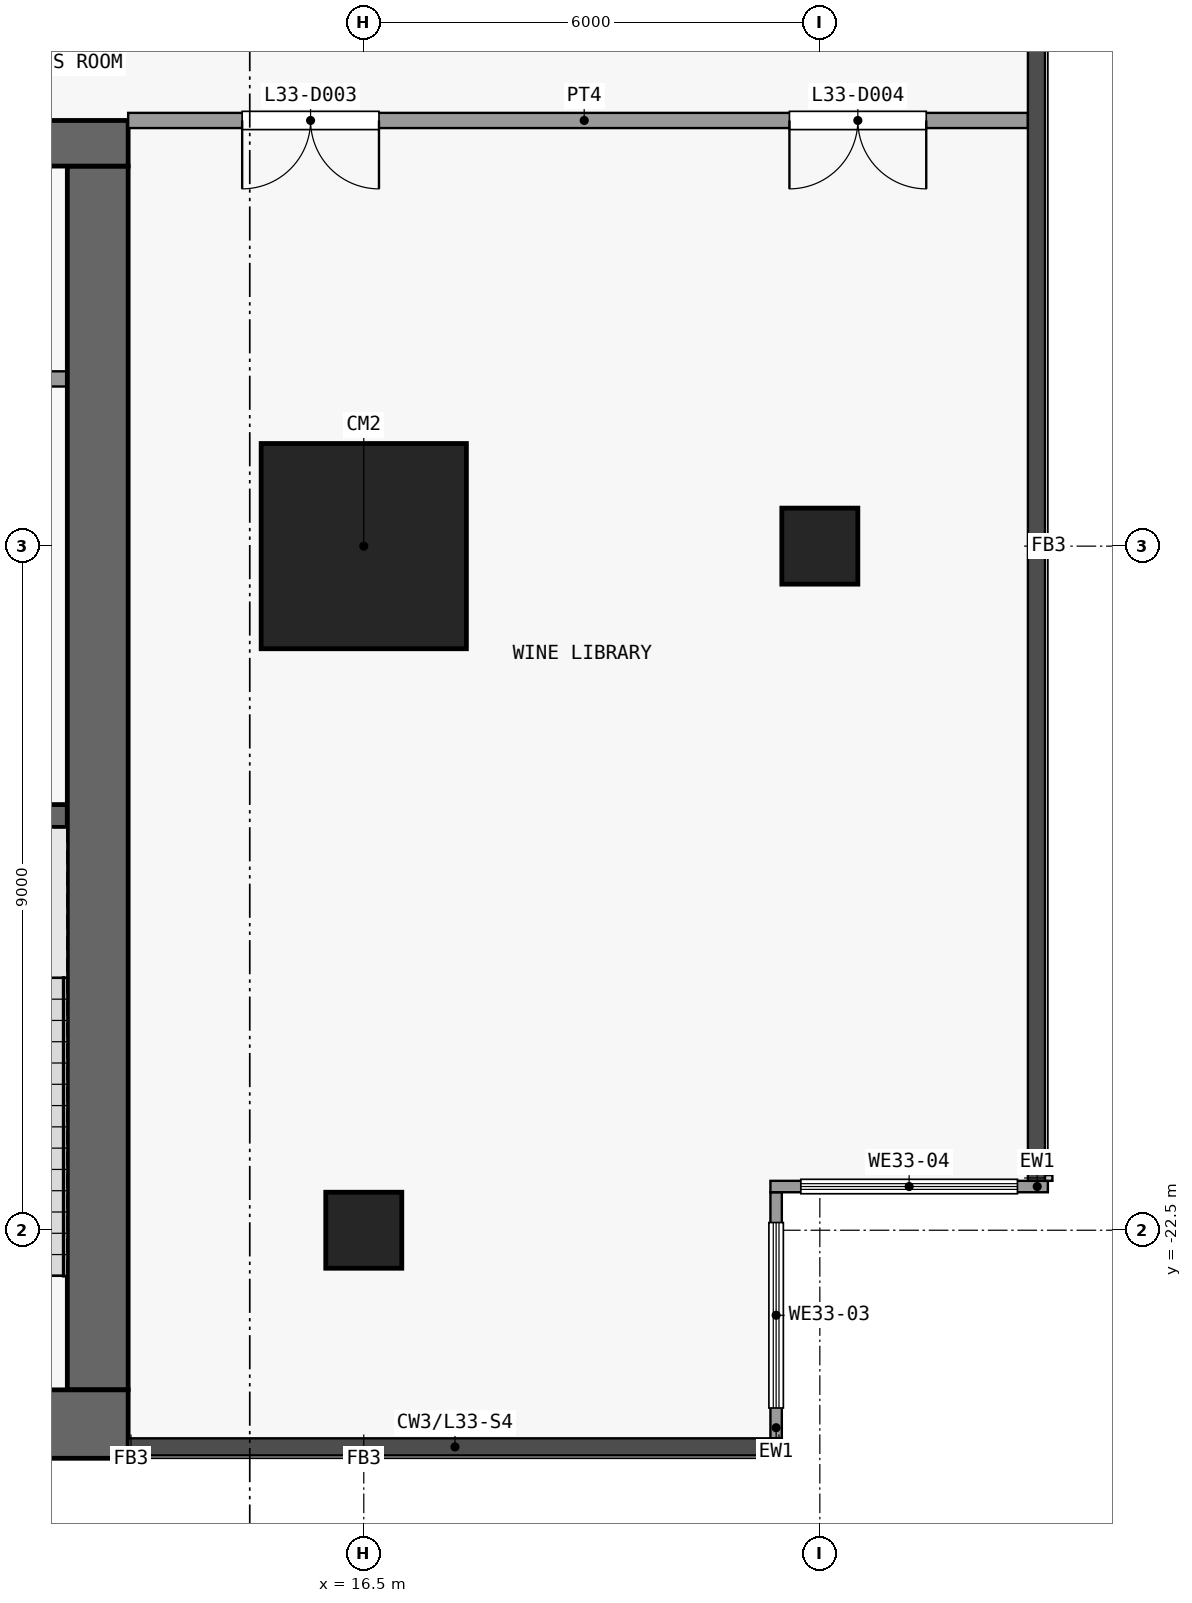
"""IFC4 building model, lengths in metres.
Left out: names, types, materials, properties, quantities, classifications, styles, units other than length and angle.
Written with IfcOpenShell. Run it as: python <this file> out.ifc"""

import sys

from ifc_helpers import new_model, si_unit, direction, frame, frame_2d, origin, origin_2d, place, context, subcontext, project, spatial, rectangle, extrude, element, fill, save


model = new_model("IFC4")
c1 = context("Model", 3, precision=1e-05, world=origin(), true_north=direction((0.0, 1.0)))
c2 = subcontext(c1, "Body", "Model", "MODEL_VIEW")
j1 = project(units=[si_unit("LENGTHUNIT", "METRE"), si_unit("PLANEANGLEUNIT", "RADIAN")], contexts=[c1])
p1 = place(None, origin())
s1 = spatial("IfcSite", under=j1, at=p1, CompositionType="ELEMENT")
p2 = place(p1, origin())
s2 = spatial("IfcBuilding", under=s1, at=p2, CompositionType="ELEMENT")
p3 = place(p2, frame((0.0, 0.0, 133.9)))
s3 = spatial("IfcBuildingStorey", under=s2, at=p3, CompositionType="ELEMENT", Elevation=133.9)
p4 = place(p3, frame((16.5, -22.5, 0.0), z_axis=(0.0, 0.0, 1.0), x_axis=(1.0, 0.0, 0.0)))
e1 = element("IfcColumn", 1, at=p4, inside=s3, PredefinedType="COLUMN", context=c2, shape_type="SweptSolid", body=[
    extrude(rectangle(XDim=1.0, YDim=1.0, at=origin_2d()), origin(), (0.0, 0.0, 1.0), 5.0),
])
p5 = place(p3, frame((16.5, -13.5, 0.0), z_axis=(0.0, 0.0, 1.0), x_axis=(1.0, 0.0, 0.0)))
e2 = element("IfcColumn", 2, at=p5, inside=s3, PredefinedType="COLUMN", context=c2, shape_type="SweptSolid", body=[
    extrude(rectangle(XDim=2.7, YDim=2.7, at=origin_2d()), origin(), (0.0, 0.0, 1.0), 5.0),
])
p6 = place(p3, frame((22.5, -13.5, 0.0), z_axis=(0.0, 0.0, 1.0), x_axis=(1.0, 0.0, 0.0)))
e3 = element("IfcColumn", 3, at=p6, inside=s3, PredefinedType="COLUMN", context=c2, shape_type="SweptSolid", body=[
    extrude(rectangle(XDim=1.0, YDim=1.0, at=origin_2d()), origin(), (0.0, 0.0, 1.0), 5.0),
])
p7 = place(p3, frame((-13.4, -25.05, 0.0), z_axis=(0.0, 0.0, 1.0), x_axis=(1.0, 0.0, 0.0)))
e4 = element("IfcWall", 4, at=p7, inside=s3, PredefinedType="SHEAR", context=c2, shape_type="SweptSolid", body=[
    extrude(rectangle(XDim=26.8, YDim=0.9, at=frame_2d((13.4, 0.0))), origin(), (0.0, 0.0, 1.0), 4.7),
])
p8 = place(p3, frame((-13.4, -8.2, 0.0), z_axis=(0.0, 0.0, 1.0), x_axis=(1.0, 0.0, 0.0)))
e5 = element("IfcWall", 5, at=p8, inside=s3, PredefinedType="SHEAR", context=c2, shape_type="SweptSolid", body=[
    extrude(rectangle(XDim=26.8, YDim=0.6, at=frame_2d((13.4, 0.0))), origin(), (0.0, 0.0, 1.0), 4.7),
])
p9 = place(p8, frame((7.7, 0.0, 0.0)))
e6 = element("IfcOpeningElement", 6, at=p9, cuts=e5, PredefinedType="OPENING", context=c2, shape_type="SweptSolid", body=[
    extrude(rectangle(XDim=1.8, YDim=2.1, at=frame_2d((0.9, 1.05))), frame((0.0, 0.31, 0.0), z_axis=(0.0, -1.0, 0.0), x_axis=(1.0, 0.0, 0.0)), (0.0, 0.0, 1.0), 0.62),
])
p10 = place(p8, frame((17.3, 0.0, 0.0)))
e7 = element("IfcOpeningElement", 7, at=p10, cuts=e5, PredefinedType="OPENING", context=c2, shape_type="SweptSolid", body=[
    extrude(rectangle(XDim=1.8, YDim=2.1, at=frame_2d((0.9, 1.05))), frame((0.0, 0.31, 0.0), z_axis=(0.0, -1.0, 0.0), x_axis=(1.0, 0.0, 0.0)), (0.0, 0.0, 1.0), 0.62),
])
p11 = place(p8, frame((2.625, 0.0, 0.0)))
e8 = element("IfcOpeningElement", 8, at=p11, cuts=e5, PredefinedType="OPENING", context=c2, shape_type="SweptSolid", body=[
    extrude(rectangle(XDim=0.9, YDim=2.1, at=frame_2d((0.45, 1.05))), frame((0.0, 0.31, 0.0), z_axis=(0.0, -1.0, 0.0), x_axis=(1.0, 0.0, 0.0)), (0.0, 0.0, 1.0), 0.62),
])
p12 = place(p8, frame((23.275, 0.0, 0.0)))
e9 = element("IfcOpeningElement", 9, at=p12, cuts=e5, PredefinedType="OPENING", context=c2, shape_type="SweptSolid", body=[
    extrude(rectangle(XDim=0.9, YDim=2.1, at=frame_2d((0.45, 1.05))), frame((0.0, 0.31, 0.0), z_axis=(0.0, -1.0, 0.0), x_axis=(1.0, 0.0, 0.0)), (0.0, 0.0, 1.0), 0.62),
])
p13 = place(p3, frame((13.0, -24.6, 0.0), z_axis=(0.0, 0.0, 1.0), x_axis=(0.0, 1.0, 0.0)))
e10 = element("IfcWall", 10, at=p13, inside=s3, PredefinedType="SHEAR", context=c2, shape_type="SweptSolid", body=[
    extrude(rectangle(XDim=16.1, YDim=0.8, at=frame_2d((8.05, 0.0))), origin(), (0.0, 0.0, 1.0), 4.7),
])
p14 = place(p3, frame((9.5, -17.05, 0.0), z_axis=(0.0, 0.0, 1.0), x_axis=(1.0, 0.0, 0.0)))
e11 = element("IfcWall", 11, at=p14, inside=s3, PredefinedType="SHEAR", context=c2, shape_type="SweptSolid", body=[
    extrude(rectangle(XDim=3.1, YDim=0.3, at=frame_2d((1.55, 0.0))), origin(), (0.0, 0.0, 1.0), 4.7),
])
p15 = place(p3, frame((11.15, -11.3, 0.0), z_axis=(0.0, 0.0, 1.0), x_axis=(1.0, 0.0, 0.0)))
e12 = element("IfcWall", 12, at=p15, inside=s3, PredefinedType="PARTITIONING", context=c2, shape_type="SweptSolid", body=[
    extrude(rectangle(XDim=1.45, YDim=0.2, at=frame_2d((0.725, 0.0))), origin(), (0.0, 0.0, 1.0), 4.7),
])
p16 = place(p3, frame((21.925, -22.0, 0.0), z_axis=(0.0, 0.0, 1.0), x_axis=(0.0, -1.0, 0.0)))
e13 = element("IfcWall", 13, at=p16, inside=s3, PredefinedType="SOLIDWALL", context=c2, shape_type="SweptSolid", body=[
    extrude(rectangle(XDim=3.238, YDim=0.15, at=frame_2d((1.619, 0.0))), origin(), (0.0, 0.0, 1.0), 4.7),
])
p17 = place(p16, frame((0.399, 0.0, 0.9)))
e14 = element("IfcOpeningElement", 14, at=p17, cuts=e13, PredefinedType="OPENING", context=c2, shape_type="SweptSolid", body=[
    extrude(rectangle(XDim=2.44, YDim=2.4, at=frame_2d((1.22, 1.2))), frame((0.0, 0.085, 0.0), z_axis=(0.0, -1.0, 0.0), x_axis=(1.0, 0.0, 0.0)), (0.0, 0.0, 1.0), 0.17),
])
p18 = place(p3, frame((25.5, -21.925, 0.0), z_axis=(0.0, 0.0, 1.0), x_axis=(-1.0, 0.0, 0.0)))
e15 = element("IfcWall", 15, at=p18, inside=s3, PredefinedType="SOLIDWALL", context=c2, shape_type="SweptSolid", body=[
    extrude(rectangle(XDim=3.65, YDim=0.15, at=frame_2d((1.825, 0.0))), origin(), (0.0, 0.0, 1.0), 4.7),
])
p19 = place(p18, frame((0.4, 0.0, 0.9)))
e16 = element("IfcOpeningElement", 16, at=p19, cuts=e15, PredefinedType="OPENING", context=c2, shape_type="SweptSolid", body=[
    extrude(rectangle(XDim=2.85, YDim=2.4, at=frame_2d((1.425, 1.2))), frame((0.0, 0.085, 0.0), z_axis=(0.0, -1.0, 0.0), x_axis=(1.0, 0.0, 0.0)), (0.0, 0.0, 1.0), 0.17),
])
p20 = place(p3, frame((13.4, -7.9, 0.0), z_axis=(0.0, 0.0, 1.0), x_axis=(1.0, 0.0, 0.0)))
e17 = element("IfcWall", 17, at=p20, inside=s3, PredefinedType="PARTITIONING", context=c2, shape_type="SweptSolid", body=[
    extrude(rectangle(XDim=11.838, YDim=0.2, at=frame_2d((5.919, 0.0))), origin(), (0.0, 0.0, 1.0), 4.7),
])
p21 = place(p20, frame((1.5, 0.0, 0.0)))
e18 = element("IfcOpeningElement", 18, at=p21, cuts=e17, PredefinedType="OPENING", context=c2, shape_type="SweptSolid", body=[
    extrude(rectangle(XDim=1.8, YDim=2.1, at=frame_2d((0.9, 1.05))), frame((0.0, 0.11, 0.0), z_axis=(0.0, -1.0, 0.0), x_axis=(1.0, 0.0, 0.0)), (0.0, 0.0, 1.0), 0.22),
])
p22 = place(p20, frame((8.7, 0.0, 0.0)))
e19 = element("IfcOpeningElement", 19, at=p22, cuts=e17, PredefinedType="OPENING", context=c2, shape_type="SweptSolid", body=[
    extrude(rectangle(XDim=1.8, YDim=2.1, at=frame_2d((0.9, 1.05))), frame((0.0, 0.11, 0.0), z_axis=(0.0, -1.0, 0.0), x_axis=(1.0, 0.0, 0.0)), (0.0, 0.0, 1.0), 0.22),
])
p23 = place(p17, origin())
e20 = element("IfcWindow", 20, at=p23, inside=s3, PartitioningType="SINGLE_PANEL", PredefinedType="WINDOW", context=c2, shape_type="SweptSolid", body=[
    extrude(rectangle(XDim=2.44, YDim=2.4, at=frame_2d((1.22, 1.2))), frame((0.0, 0.03, 0.0), z_axis=(0.0, -1.0, 0.0), x_axis=(1.0, 0.0, 0.0)), (0.0, 0.0, 1.0), 0.06),
])
fill(e14, e20)
p24 = place(p19, origin())
e21 = element("IfcWindow", 21, at=p24, inside=s3, PartitioningType="SINGLE_PANEL", PredefinedType="WINDOW", context=c2, shape_type="SweptSolid", body=[
    extrude(rectangle(XDim=2.85, YDim=2.4, at=frame_2d((1.425, 1.2))), frame((0.0, 0.03, 0.0), z_axis=(0.0, -1.0, 0.0), x_axis=(1.0, 0.0, 0.0)), (0.0, 0.0, 1.0), 0.06),
])
fill(e16, e21)
p25 = place(p21, origin())
e22 = element("IfcDoor", 22, at=p25, inside=s3, OperationType="DOUBLE_DOOR_SINGLE_SWING", PredefinedType="DOOR", context=c2, shape_type="SweptSolid", body=[
    extrude(rectangle(XDim=1.8, YDim=2.1, at=frame_2d((0.9, 1.05))), frame((0.0, 0.025, 0.0), z_axis=(0.0, -1.0, 0.0), x_axis=(1.0, 0.0, 0.0)), (0.0, 0.0, 1.0), 0.05),
])
fill(e18, e22)
p26 = place(p22, origin())
e23 = element("IfcDoor", 23, at=p26, inside=s3, OperationType="DOUBLE_DOOR_SINGLE_SWING", PredefinedType="DOOR", context=c2, shape_type="SweptSolid", body=[
    extrude(rectangle(XDim=1.8, YDim=2.1, at=frame_2d((0.9, 1.05))), frame((0.0, 0.025, 0.0), z_axis=(0.0, -1.0, 0.0), x_axis=(1.0, 0.0, 0.0)), (0.0, 0.0, 1.0), 0.05),
])
fill(e19, e23)
save(model, sys.argv[1])
